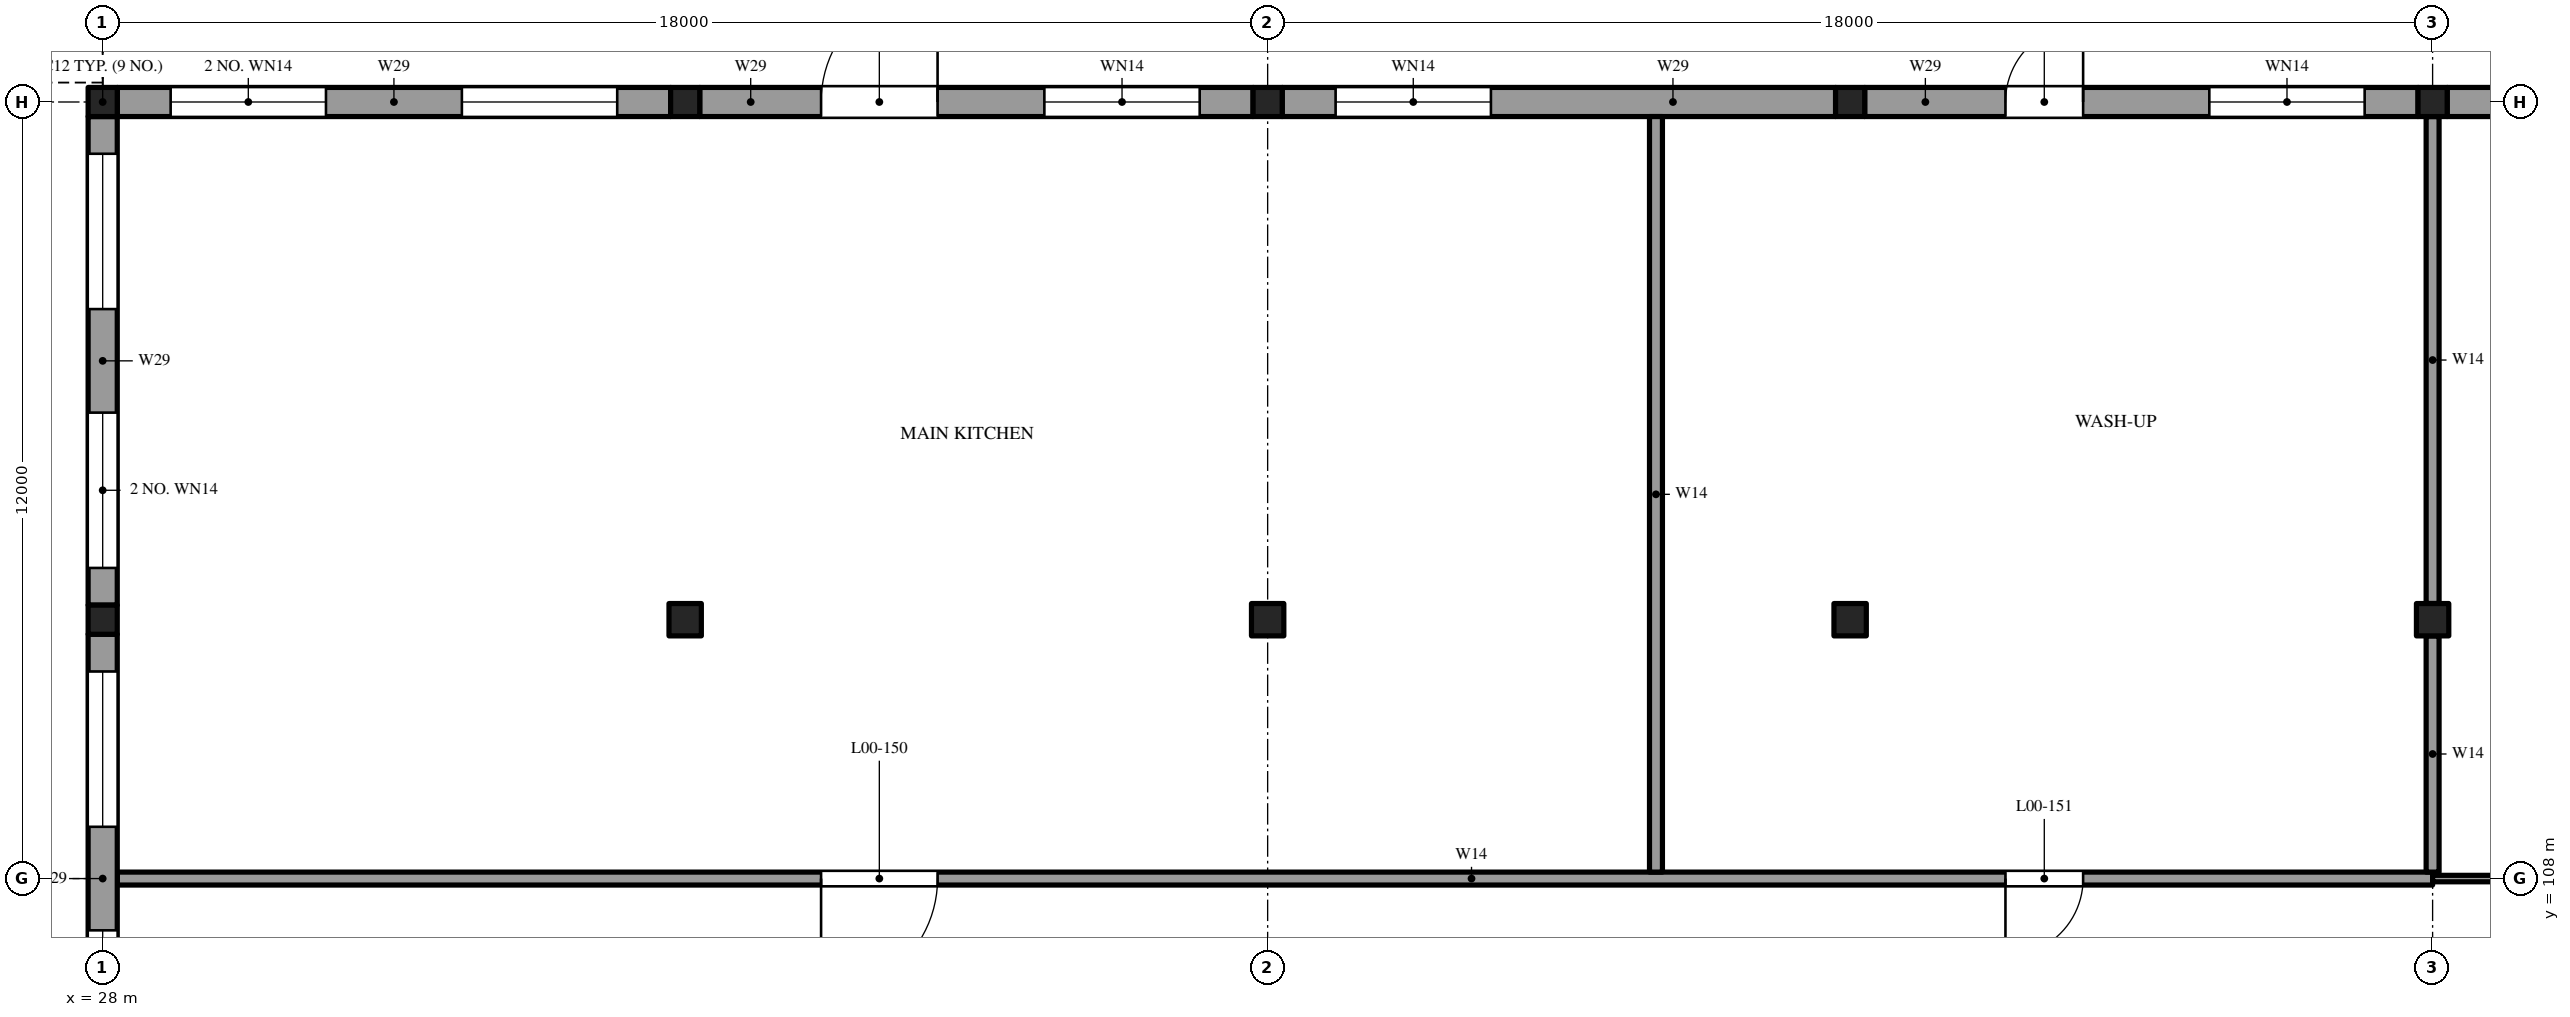
"""IFC4 building model, lengths in metres.
Left out: names, types, materials, properties, quantities, classifications, styles, units other than length and angle.
Written with IfcOpenShell. Run it as: python <this file> out.ifc"""

import sys

from ifc_helpers import new_model, si_unit, direction, frame, frame_2d, origin, origin_2d, place, context, subcontext, project, spatial, rectangle, extrude, element, fill, save


model = new_model("IFC4")
c1 = context("Model", 3, precision=1e-05, world=origin(), true_north=direction((0.0, 1.0)))
c2 = subcontext(c1, "Body", "Model", "MODEL_VIEW")
j1 = project(units=[si_unit("LENGTHUNIT", "METRE"), si_unit("PLANEANGLEUNIT", "RADIAN")], contexts=[c1])
p1 = place(None, origin())
s1 = spatial("IfcSite", under=j1, at=p1, CompositionType="ELEMENT")
p2 = place(p1, origin())
s2 = spatial("IfcBuilding", under=s1, at=p2, CompositionType="ELEMENT")
p3 = place(p2, origin())
s3 = spatial("IfcBuildingStorey", under=s2, at=p3, CompositionType="ELEMENT", Elevation=0.0)
for number, where, z_axis, x_axis in (
    (1, (28.0, 112.0, -0.4), (0.0, 0.0, 1.0), (1.0, 0.0, 0.0)),
    (2, (28.0, 120.0, -0.4), (0.0, 0.0, 1.0), (1.0, 0.0, 0.0)),
):
    element("IfcColumn", number, at=place(p3, frame(where, z_axis=z_axis, x_axis=x_axis)), inside=s3, PredefinedType="COLUMN", context=c2, shape_type="SweptSolid", body=[
        extrude(rectangle(XDim=0.45, YDim=0.45, at=origin_2d()), origin(), (0.0, 0.0, 1.0), 7.6),
    ])
p4 = place(p3, frame((37.0, 112.0, -0.4), z_axis=(0.0, 0.0, 1.0), x_axis=(1.0, 0.0, 0.0)))
e3 = element("IfcColumn", 3, at=p4, inside=s3, PredefinedType="COLUMN", context=c2, shape_type="SweptSolid", body=[
    extrude(rectangle(XDim=0.5, YDim=0.5, at=origin_2d()), origin(), (0.0, 0.0, 1.0), 7.6),
])
p5 = place(p3, frame((37.0, 120.0, -0.4), z_axis=(0.0, 0.0, 1.0), x_axis=(1.0, 0.0, 0.0)))
e4 = element("IfcColumn", 4, at=p5, inside=s3, PredefinedType="COLUMN", context=c2, shape_type="SweptSolid", body=[
    extrude(rectangle(XDim=0.45, YDim=0.45, at=origin_2d()), origin(), (0.0, 0.0, 1.0), 7.6),
])
p6 = place(p3, frame((46.0, 112.0, -0.4), z_axis=(0.0, 0.0, 1.0), x_axis=(1.0, 0.0, 0.0)))
e5 = element("IfcColumn", 5, at=p6, inside=s3, PredefinedType="COLUMN", context=c2, shape_type="SweptSolid", body=[
    extrude(rectangle(XDim=0.5, YDim=0.5, at=origin_2d()), origin(), (0.0, 0.0, 1.0), 7.6),
])
p7 = place(p3, frame((46.0, 120.0, -0.4), z_axis=(0.0, 0.0, 1.0), x_axis=(1.0, 0.0, 0.0)))
e6 = element("IfcColumn", 6, at=p7, inside=s3, PredefinedType="COLUMN", context=c2, shape_type="SweptSolid", body=[
    extrude(rectangle(XDim=0.45, YDim=0.45, at=origin_2d()), origin(), (0.0, 0.0, 1.0), 7.6),
])
p8 = place(p3, frame((55.0, 112.0, -0.4), z_axis=(0.0, 0.0, 1.0), x_axis=(1.0, 0.0, 0.0)))
e7 = element("IfcColumn", 7, at=p8, inside=s3, PredefinedType="COLUMN", context=c2, shape_type="SweptSolid", body=[
    extrude(rectangle(XDim=0.5, YDim=0.5, at=origin_2d()), origin(), (0.0, 0.0, 1.0), 7.6),
])
p9 = place(p3, frame((55.0, 120.0, -0.4), z_axis=(0.0, 0.0, 1.0), x_axis=(1.0, 0.0, 0.0)))
e8 = element("IfcColumn", 8, at=p9, inside=s3, PredefinedType="COLUMN", context=c2, shape_type="SweptSolid", body=[
    extrude(rectangle(XDim=0.45, YDim=0.45, at=origin_2d()), origin(), (0.0, 0.0, 1.0), 7.6),
])
p10 = place(p3, frame((64.0, 112.0, -0.4), z_axis=(0.0, 0.0, 1.0), x_axis=(1.0, 0.0, 0.0)))
e9 = element("IfcColumn", 9, at=p10, inside=s3, PredefinedType="COLUMN", context=c2, shape_type="SweptSolid", body=[
    extrude(rectangle(XDim=0.5, YDim=0.5, at=origin_2d()), origin(), (0.0, 0.0, 1.0), 7.6),
])
p11 = place(p3, frame((64.0, 120.0, -0.4), z_axis=(0.0, 0.0, 1.0), x_axis=(1.0, 0.0, 0.0)))
e10 = element("IfcColumn", 10, at=p11, inside=s3, PredefinedType="COLUMN", context=c2, shape_type="SweptSolid", body=[
    extrude(rectangle(XDim=0.45, YDim=0.45, at=origin_2d()), origin(), (0.0, 0.0, 1.0), 7.6),
])
p12 = place(p3, frame((28.225, 108.0, 0.0), z_axis=(0.0, 0.0, 1.0), x_axis=(1.0, 0.0, 0.0)))
e11 = element("IfcWall", 11, at=p12, inside=s3, PredefinedType="SOLIDWALL", context=c2, shape_type="SweptSolid", body=[
    extrude(rectangle(XDim=35.775, YDim=0.2, at=frame_2d((17.887, 0.0))), origin(), (0.0, 0.0, 1.0), 6.9),
])
p13 = place(p12, frame((10.875, 0.0, 0.0)))
e12 = element("IfcOpeningElement", 12, at=p13, cuts=e11, PredefinedType="OPENING", context=c2, shape_type="SweptSolid", body=[
    extrude(rectangle(XDim=1.8, YDim=2.1, at=frame_2d((0.9, 1.05))), frame((0.0, 0.11, 0.0), z_axis=(0.0, -1.0, 0.0), x_axis=(1.0, 0.0, 0.0)), (0.0, 0.0, 1.0), 0.22),
])
p14 = place(p12, frame((29.175, 0.0, 0.0)))
e13 = element("IfcOpeningElement", 13, at=p14, cuts=e11, PredefinedType="OPENING", context=c2, shape_type="SweptSolid", body=[
    extrude(rectangle(XDim=1.2, YDim=2.1, at=frame_2d((0.6, 1.05))), frame((0.0, 0.11, 0.0), z_axis=(0.0, -1.0, 0.0), x_axis=(1.0, 0.0, 0.0)), (0.0, 0.0, 1.0), 0.22),
])
p15 = place(p3, frame((64.0, 108.0, 0.0), z_axis=(0.0, 0.0, 1.0), x_axis=(1.0, 0.0, 0.0)))
e14 = element("IfcWall", 14, at=p15, inside=s3, PredefinedType="PARTITIONING", context=c2, shape_type="SweptSolid", body=[
    extrude(rectangle(XDim=9.0, YDim=0.1, at=frame_2d((4.5, 0.0))), origin(), (0.0, 0.0, 1.0), 6.9),
])
p16 = place(p15, frame((4.0, 0.0, 0.0)))
e15 = element("IfcOpeningElement", 15, at=p16, cuts=e14, PredefinedType="OPENING", context=c2, shape_type="SweptSolid", body=[
    extrude(rectangle(XDim=1.0, YDim=2.1, at=frame_2d((0.5, 1.05))), frame((0.0, 0.06, 0.0), z_axis=(0.0, -1.0, 0.0), x_axis=(1.0, 0.0, 0.0)), (0.0, 0.0, 1.0), 0.12),
])
p17 = place(p3, frame((36.775, 120.0, 0.0), z_axis=(0.0, 0.0, 1.0), x_axis=(-1.0, 0.0, 0.0)))
e16 = element("IfcWall", 16, at=p17, inside=s3, PredefinedType="SOLIDWALL", context=c2, shape_type="SweptSolid", body=[
    extrude(rectangle(XDim=8.55, YDim=0.45, at=frame_2d((4.275, 0.0))), origin(), (0.0, 0.0, 1.0), 6.9),
])
p18 = place(p17, frame((5.325, 0.0, 4.4)))
e17 = element("IfcOpeningElement", 17, at=p18, cuts=e16, PredefinedType="OPENING", context=c2, shape_type="SweptSolid", body=[
    extrude(rectangle(XDim=2.4, YDim=1.6, at=frame_2d((1.2, 0.8))), frame((0.0, 0.235, 0.0), z_axis=(0.0, -1.0, 0.0), x_axis=(1.0, 0.0, 0.0)), (0.0, 0.0, 1.0), 0.47),
])
p19 = place(p17, frame((0.825, 0.0, 4.4)))
e18 = element("IfcOpeningElement", 18, at=p19, cuts=e16, PredefinedType="OPENING", context=c2, shape_type="SweptSolid", body=[
    extrude(rectangle(XDim=2.4, YDim=1.6, at=frame_2d((1.2, 0.8))), frame((0.0, 0.235, 0.0), z_axis=(0.0, -1.0, 0.0), x_axis=(1.0, 0.0, 0.0)), (0.0, 0.0, 1.0), 0.47),
])
p20 = place(p3, frame((45.775, 120.0, 0.0), z_axis=(0.0, 0.0, 1.0), x_axis=(-1.0, 0.0, 0.0)))
e19 = element("IfcWall", 19, at=p20, inside=s3, PredefinedType="SOLIDWALL", context=c2, shape_type="SweptSolid", body=[
    extrude(rectangle(XDim=8.55, YDim=0.45, at=frame_2d((4.275, 0.0))), origin(), (0.0, 0.0, 1.0), 6.9),
])
p21 = place(p20, frame((4.875, 0.0, 0.0)))
e20 = element("IfcOpeningElement", 20, at=p21, cuts=e19, PredefinedType="OPENING", context=c2, shape_type="SweptSolid", body=[
    extrude(rectangle(XDim=1.8, YDim=2.1, at=frame_2d((0.9, 1.05))), frame((0.0, 0.235, 0.0), z_axis=(0.0, -1.0, 0.0), x_axis=(1.0, 0.0, 0.0)), (0.0, 0.0, 1.0), 0.47),
])
p22 = place(p20, frame((0.825, 0.0, 4.4)))
e21 = element("IfcOpeningElement", 21, at=p22, cuts=e19, PredefinedType="OPENING", context=c2, shape_type="SweptSolid", body=[
    extrude(rectangle(XDim=2.4, YDim=1.6, at=frame_2d((1.2, 0.8))), frame((0.0, 0.235, 0.0), z_axis=(0.0, -1.0, 0.0), x_axis=(1.0, 0.0, 0.0)), (0.0, 0.0, 1.0), 0.47),
])
p23 = place(p3, frame((54.775, 120.0, 0.0), z_axis=(0.0, 0.0, 1.0), x_axis=(-1.0, 0.0, 0.0)))
e22 = element("IfcWall", 22, at=p23, inside=s3, PredefinedType="SOLIDWALL", context=c2, shape_type="SweptSolid", body=[
    extrude(rectangle(XDim=8.55, YDim=0.45, at=frame_2d((4.275, 0.0))), origin(), (0.0, 0.0, 1.0), 6.9),
])
p24 = place(p23, frame((5.325, 0.0, 4.4)))
e23 = element("IfcOpeningElement", 23, at=p24, cuts=e22, PredefinedType="OPENING", context=c2, shape_type="SweptSolid", body=[
    extrude(rectangle(XDim=2.4, YDim=1.6, at=frame_2d((1.2, 0.8))), frame((0.0, 0.235, 0.0), z_axis=(0.0, -1.0, 0.0), x_axis=(1.0, 0.0, 0.0)), (0.0, 0.0, 1.0), 0.47),
])
p25 = place(p3, frame((63.775, 120.0, 0.0), z_axis=(0.0, 0.0, 1.0), x_axis=(-1.0, 0.0, 0.0)))
e24 = element("IfcWall", 24, at=p25, inside=s3, PredefinedType="SOLIDWALL", context=c2, shape_type="SweptSolid", body=[
    extrude(rectangle(XDim=8.55, YDim=0.45, at=frame_2d((4.275, 0.0))), origin(), (0.0, 0.0, 1.0), 6.9),
])
p26 = place(p25, frame((5.175, 0.0, 0.0)))
e25 = element("IfcOpeningElement", 25, at=p26, cuts=e24, PredefinedType="OPENING", context=c2, shape_type="SweptSolid", body=[
    extrude(rectangle(XDim=1.2, YDim=2.1, at=frame_2d((0.6, 1.05))), frame((0.0, 0.235, 0.0), z_axis=(0.0, -1.0, 0.0), x_axis=(1.0, 0.0, 0.0)), (0.0, 0.0, 1.0), 0.47),
])
p27 = place(p25, frame((0.825, 0.0, 4.4)))
e26 = element("IfcOpeningElement", 26, at=p27, cuts=e24, PredefinedType="OPENING", context=c2, shape_type="SweptSolid", body=[
    extrude(rectangle(XDim=2.4, YDim=1.6, at=frame_2d((1.2, 0.8))), frame((0.0, 0.235, 0.0), z_axis=(0.0, -1.0, 0.0), x_axis=(1.0, 0.0, 0.0)), (0.0, 0.0, 1.0), 0.47),
])
p28 = place(p3, frame((72.775, 120.0, 0.0), z_axis=(0.0, 0.0, 1.0), x_axis=(-1.0, 0.0, 0.0)))
e27 = element("IfcWall", 27, at=p28, inside=s3, PredefinedType="SOLIDWALL", context=c2, shape_type="SweptSolid", body=[
    extrude(rectangle(XDim=8.55, YDim=0.45, at=frame_2d((4.275, 0.0))), origin(), (0.0, 0.0, 1.0), 6.9),
])
p29 = place(p28, frame((4.175, 0.0, 0.0)))
e28 = element("IfcOpeningElement", 28, at=p29, cuts=e27, PredefinedType="OPENING", context=c2, shape_type="SweptSolid", body=[
    extrude(rectangle(XDim=1.2, YDim=2.1, at=frame_2d((0.6, 1.05))), frame((0.0, 0.235, 0.0), z_axis=(0.0, -1.0, 0.0), x_axis=(1.0, 0.0, 0.0)), (0.0, 0.0, 1.0), 0.47),
])
p30 = place(p28, frame((0.825, 0.0, 4.4)))
e29 = element("IfcOpeningElement", 29, at=p30, cuts=e27, PredefinedType="OPENING", context=c2, shape_type="SweptSolid", body=[
    extrude(rectangle(XDim=2.4, YDim=1.6, at=frame_2d((1.2, 0.8))), frame((0.0, 0.235, 0.0), z_axis=(0.0, -1.0, 0.0), x_axis=(1.0, 0.0, 0.0)), (0.0, 0.0, 1.0), 0.47),
])
p31 = place(p3, frame((28.0, 111.775, 0.0), z_axis=(0.0, 0.0, 1.0), x_axis=(0.0, -1.0, 0.0)))
e30 = element("IfcWall", 30, at=p31, inside=s3, PredefinedType="SOLIDWALL", context=c2, shape_type="SweptSolid", body=[
    extrude(rectangle(XDim=7.55, YDim=0.45, at=frame_2d((3.775, 0.0))), origin(), (0.0, 0.0, 1.0), 6.9),
])
p32 = place(p31, frame((4.575, 0.0, 4.4)))
e31 = element("IfcOpeningElement", 31, at=p32, cuts=e30, PredefinedType="OPENING", context=c2, shape_type="SweptSolid", body=[
    extrude(rectangle(XDim=2.4, YDim=1.6, at=frame_2d((1.2, 0.8))), frame((0.0, 0.235, 0.0), z_axis=(0.0, -1.0, 0.0), x_axis=(1.0, 0.0, 0.0)), (0.0, 0.0, 1.0), 0.47),
])
p33 = place(p31, frame((0.575, 0.0, 4.4)))
e32 = element("IfcOpeningElement", 32, at=p33, cuts=e30, PredefinedType="OPENING", context=c2, shape_type="SweptSolid", body=[
    extrude(rectangle(XDim=2.4, YDim=1.6, at=frame_2d((1.2, 0.8))), frame((0.0, 0.235, 0.0), z_axis=(0.0, -1.0, 0.0), x_axis=(1.0, 0.0, 0.0)), (0.0, 0.0, 1.0), 0.47),
])
p34 = place(p3, frame((28.0, 119.775, 0.0), z_axis=(0.0, 0.0, 1.0), x_axis=(0.0, -1.0, 0.0)))
e33 = element("IfcWall", 33, at=p34, inside=s3, PredefinedType="SOLIDWALL", context=c2, shape_type="SweptSolid", body=[
    extrude(rectangle(XDim=7.55, YDim=0.45, at=frame_2d((3.775, 0.0))), origin(), (0.0, 0.0, 1.0), 6.9),
])
p35 = place(p34, frame((4.575, 0.0, 4.4)))
e34 = element("IfcOpeningElement", 34, at=p35, cuts=e33, PredefinedType="OPENING", context=c2, shape_type="SweptSolid", body=[
    extrude(rectangle(XDim=2.4, YDim=1.6, at=frame_2d((1.2, 0.8))), frame((0.0, 0.235, 0.0), z_axis=(0.0, -1.0, 0.0), x_axis=(1.0, 0.0, 0.0)), (0.0, 0.0, 1.0), 0.47),
])
p36 = place(p34, frame((0.575, 0.0, 4.4)))
e35 = element("IfcOpeningElement", 35, at=p36, cuts=e33, PredefinedType="OPENING", context=c2, shape_type="SweptSolid", body=[
    extrude(rectangle(XDim=2.4, YDim=1.6, at=frame_2d((1.2, 0.8))), frame((0.0, 0.235, 0.0), z_axis=(0.0, -1.0, 0.0), x_axis=(1.0, 0.0, 0.0)), (0.0, 0.0, 1.0), 0.47),
])
p37 = place(p3, frame((52.0, 108.1, 0.0), z_axis=(0.0, 0.0, 1.0), x_axis=(0.0, 1.0, 0.0)))
e36 = element("IfcWall", 36, at=p37, inside=s3, PredefinedType="SOLIDWALL", context=c2, shape_type="SweptSolid", body=[
    extrude(rectangle(XDim=11.675, YDim=0.2, at=frame_2d((5.837, 0.0))), origin(), (0.0, 0.0, 1.0), 6.9),
])
p38 = place(p3, frame((64.0, 108.1, 0.0), z_axis=(0.0, 0.0, 1.0), x_axis=(0.0, 1.0, 0.0)))
e37 = element("IfcWall", 37, at=p38, inside=s3, PredefinedType="SOLIDWALL", context=c2, shape_type="SweptSolid", body=[
    extrude(rectangle(XDim=3.65, YDim=0.2, at=frame_2d((1.825, 0.0))), origin(), (0.0, 0.0, 1.0), 6.9),
])
p39 = place(p3, frame((64.0, 112.25, 0.0), z_axis=(0.0, 0.0, 1.0), x_axis=(0.0, 1.0, 0.0)))
e38 = element("IfcWall", 38, at=p39, inside=s3, PredefinedType="SOLIDWALL", context=c2, shape_type="SweptSolid", body=[
    extrude(rectangle(XDim=7.525, YDim=0.2, at=frame_2d((3.762, 0.0))), origin(), (0.0, 0.0, 1.0), 6.9),
])
p40 = place(p13, frame((1.8, 0.0, 0.0), z_axis=(0.0, 0.0, 1.0), x_axis=(-1.0, 0.0, 0.0)))
e39 = element("IfcDoor", 39, at=p40, inside=s3, OperationType="DOUBLE_DOOR_SINGLE_SWING", PredefinedType="DOOR", context=c2, shape_type="SweptSolid", body=[
    extrude(rectangle(XDim=1.8, YDim=2.1, at=frame_2d((0.9, 1.05))), frame((0.0, 0.025, 0.0), z_axis=(0.0, -1.0, 0.0), x_axis=(1.0, 0.0, 0.0)), (0.0, 0.0, 1.0), 0.05),
])
fill(e12, e39)
p41 = place(p14, frame((1.2, 0.0, 0.0), z_axis=(0.0, 0.0, 1.0), x_axis=(-1.0, 0.0, 0.0)))
e40 = element("IfcDoor", 40, at=p41, inside=s3, OperationType="SINGLE_SWING_RIGHT", PredefinedType="DOOR", context=c2, shape_type="SweptSolid", body=[
    extrude(rectangle(XDim=1.2, YDim=2.1, at=frame_2d((0.6, 1.05))), frame((0.0, 0.025, 0.0), z_axis=(0.0, -1.0, 0.0), x_axis=(1.0, 0.0, 0.0)), (0.0, 0.0, 1.0), 0.05),
])
fill(e13, e40)
p42 = place(p21, frame((1.8, 0.0, 0.0), z_axis=(0.0, 0.0, 1.0), x_axis=(-1.0, 0.0, 0.0)))
e41 = element("IfcDoor", 41, at=p42, inside=s3, OperationType="DOUBLE_DOOR_SINGLE_SWING", PredefinedType="DOOR", context=c2, shape_type="SweptSolid", body=[
    extrude(rectangle(XDim=1.8, YDim=2.1, at=frame_2d((0.9, 1.05))), frame((0.0, 0.025, 0.0), z_axis=(0.0, -1.0, 0.0), x_axis=(1.0, 0.0, 0.0)), (0.0, 0.0, 1.0), 0.05),
])
fill(e20, e41)
p43 = place(p26, frame((1.2, 0.0, 0.0), z_axis=(0.0, 0.0, 1.0), x_axis=(-1.0, 0.0, 0.0)))
e42 = element("IfcDoor", 42, at=p43, inside=s3, OperationType="SINGLE_SWING_RIGHT", PredefinedType="DOOR", context=c2, shape_type="SweptSolid", body=[
    extrude(rectangle(XDim=1.2, YDim=2.1, at=frame_2d((0.6, 1.05))), frame((0.0, 0.025, 0.0), z_axis=(0.0, -1.0, 0.0), x_axis=(1.0, 0.0, 0.0)), (0.0, 0.0, 1.0), 0.05),
])
fill(e25, e42)
p44 = place(p18, origin())
e43 = element("IfcWindow", 43, at=p44, inside=s3, PartitioningType="SINGLE_PANEL", PredefinedType="WINDOW", context=c2, shape_type="SweptSolid", body=[
    extrude(rectangle(XDim=2.4, YDim=1.6, at=frame_2d((1.2, 0.8))), frame((0.0, 0.215, 0.0), z_axis=(0.0, -1.0, 0.0), x_axis=(1.0, 0.0, 0.0)), (0.0, 0.0, 1.0), 0.06),
])
fill(e17, e43)
p45 = place(p19, origin())
e44 = element("IfcWindow", 44, at=p45, inside=s3, PartitioningType="SINGLE_PANEL", PredefinedType="WINDOW", context=c2, shape_type="SweptSolid", body=[
    extrude(rectangle(XDim=2.4, YDim=1.6, at=frame_2d((1.2, 0.8))), frame((0.0, 0.215, 0.0), z_axis=(0.0, -1.0, 0.0), x_axis=(1.0, 0.0, 0.0)), (0.0, 0.0, 1.0), 0.06),
])
fill(e18, e44)
p46 = place(p22, origin())
e45 = element("IfcWindow", 45, at=p46, inside=s3, PartitioningType="SINGLE_PANEL", PredefinedType="WINDOW", context=c2, shape_type="SweptSolid", body=[
    extrude(rectangle(XDim=2.4, YDim=1.6, at=frame_2d((1.2, 0.8))), frame((0.0, 0.215, 0.0), z_axis=(0.0, -1.0, 0.0), x_axis=(1.0, 0.0, 0.0)), (0.0, 0.0, 1.0), 0.06),
])
fill(e21, e45)
p47 = place(p24, origin())
e46 = element("IfcWindow", 46, at=p47, inside=s3, PartitioningType="SINGLE_PANEL", PredefinedType="WINDOW", context=c2, shape_type="SweptSolid", body=[
    extrude(rectangle(XDim=2.4, YDim=1.6, at=frame_2d((1.2, 0.8))), frame((0.0, 0.215, 0.0), z_axis=(0.0, -1.0, 0.0), x_axis=(1.0, 0.0, 0.0)), (0.0, 0.0, 1.0), 0.06),
])
fill(e23, e46)
p48 = place(p27, origin())
e47 = element("IfcWindow", 47, at=p48, inside=s3, PartitioningType="SINGLE_PANEL", PredefinedType="WINDOW", context=c2, shape_type="SweptSolid", body=[
    extrude(rectangle(XDim=2.4, YDim=1.6, at=frame_2d((1.2, 0.8))), frame((0.0, 0.215, 0.0), z_axis=(0.0, -1.0, 0.0), x_axis=(1.0, 0.0, 0.0)), (0.0, 0.0, 1.0), 0.06),
])
fill(e26, e47)
p49 = place(p32, origin())
e48 = element("IfcWindow", 48, at=p49, inside=s3, PartitioningType="SINGLE_PANEL", PredefinedType="WINDOW", context=c2, shape_type="SweptSolid", body=[
    extrude(rectangle(XDim=2.4, YDim=1.6, at=frame_2d((1.2, 0.8))), frame((0.0, 0.215, 0.0), z_axis=(0.0, -1.0, 0.0), x_axis=(1.0, 0.0, 0.0)), (0.0, 0.0, 1.0), 0.06),
])
fill(e31, e48)
p50 = place(p33, origin())
e49 = element("IfcWindow", 49, at=p50, inside=s3, PartitioningType="SINGLE_PANEL", PredefinedType="WINDOW", context=c2, shape_type="SweptSolid", body=[
    extrude(rectangle(XDim=2.4, YDim=1.6, at=frame_2d((1.2, 0.8))), frame((0.0, 0.215, 0.0), z_axis=(0.0, -1.0, 0.0), x_axis=(1.0, 0.0, 0.0)), (0.0, 0.0, 1.0), 0.06),
])
fill(e32, e49)
p51 = place(p35, origin())
e50 = element("IfcWindow", 50, at=p51, inside=s3, PartitioningType="SINGLE_PANEL", PredefinedType="WINDOW", context=c2, shape_type="SweptSolid", body=[
    extrude(rectangle(XDim=2.4, YDim=1.6, at=frame_2d((1.2, 0.8))), frame((0.0, 0.215, 0.0), z_axis=(0.0, -1.0, 0.0), x_axis=(1.0, 0.0, 0.0)), (0.0, 0.0, 1.0), 0.06),
])
fill(e34, e50)
p52 = place(p36, origin())
e51 = element("IfcWindow", 51, at=p52, inside=s3, PartitioningType="SINGLE_PANEL", PredefinedType="WINDOW", context=c2, shape_type="SweptSolid", body=[
    extrude(rectangle(XDim=2.4, YDim=1.6, at=frame_2d((1.2, 0.8))), frame((0.0, 0.215, 0.0), z_axis=(0.0, -1.0, 0.0), x_axis=(1.0, 0.0, 0.0)), (0.0, 0.0, 1.0), 0.06),
])
fill(e35, e51)
save(model, sys.argv[1])
